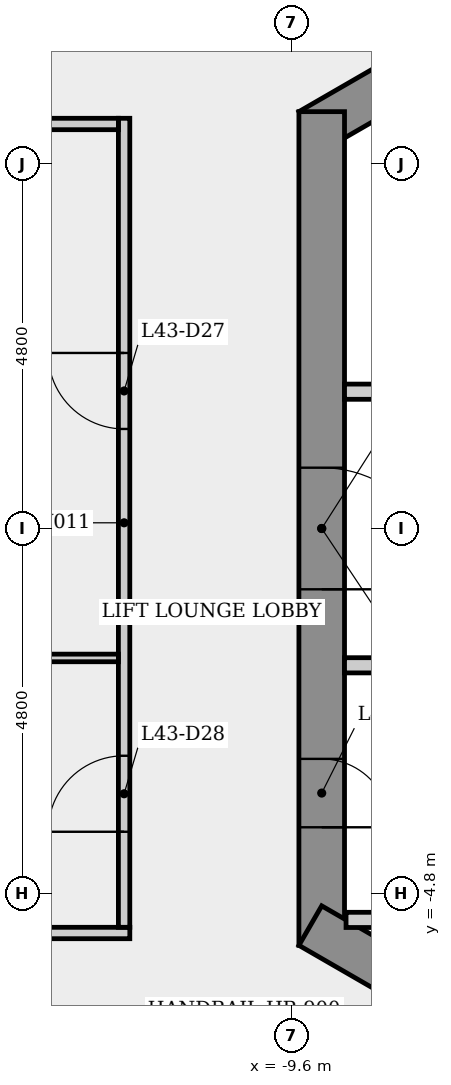
"""IFC4 building model, lengths in metres.
Left out: names, types, materials, properties, quantities, classifications, styles, units other than length and angle.
Written with IfcOpenShell. Run it as: python <this file> out.ifc"""

import sys

from ifc_helpers import new_model, si_unit, direction, frame, frame_2d, origin, place, context, subcontext, project, spatial, rectangle, extrude, element, fill, save


model = new_model("IFC4")
c1 = context("Model", 3, precision=1e-05, world=origin(), true_north=direction((0.0, 1.0)))
c2 = subcontext(c1, "Body", "Model", "MODEL_VIEW")
j1 = project(units=[si_unit("LENGTHUNIT", "METRE"), si_unit("PLANEANGLEUNIT", "RADIAN")], contexts=[c1])
p1 = place(None, origin())
s1 = spatial("IfcSite", under=j1, at=p1, CompositionType="ELEMENT")
p2 = place(p1, origin())
s2 = spatial("IfcBuilding", under=s1, at=p2, CompositionType="ELEMENT")
p3 = place(p2, frame((0.0, 0.0, 162.9)))
s3 = spatial("IfcBuildingStorey", under=s2, at=p3, CompositionType="ELEMENT", Elevation=162.9)
p4 = place(p3, frame((0.15, 10.71, 0.0), z_axis=(0.0, 0.0, 1.0), x_axis=(-0.866023993627, -0.500002442456, 0.0)))
e1 = element("IfcWall", 1, at=p4, inside=s3, PredefinedType="SHEAR", context=c2, shape_type="SweptSolid", body=[
    extrude(rectangle(XDim=10.97, YDim=0.6, at=frame_2d((5.485, 0.0))), origin(), (0.0, 0.0, 1.0), 3.4),
])
p5 = place(p4, frame((7.05, 0.0, 0.0)))
e2 = element("IfcOpeningElement", 2, at=p5, cuts=e1, PredefinedType="OPENING", context=c2, shape_type="SweptSolid", body=[
    extrude(rectangle(XDim=0.9, YDim=2.1, at=frame_2d((0.45, 1.05))), frame((0.0, 0.31, 0.0), z_axis=(0.0, -1.0, 0.0), x_axis=(1.0, 0.0, 0.0)), (0.0, 0.0, 1.0), 0.62),
])
p6 = place(p3, frame((-9.2, 5.485, 0.0), z_axis=(0.0, 0.0, 1.0), x_axis=(0.0, -1.0, 0.0)))
e3 = element("IfcWall", 3, at=p6, inside=s3, PredefinedType="SHEAR", context=c2, shape_type="SweptSolid", body=[
    extrude(rectangle(XDim=10.97, YDim=0.6, at=frame_2d((5.485, 0.0))), origin(), (0.0, 0.0, 1.0), 3.4),
])
p7 = place(p6, frame((8.516, 0.0, 0.0)))
e4 = element("IfcOpeningElement", 4, at=p7, cuts=e3, PredefinedType="OPENING", context=c2, shape_type="SweptSolid", body=[
    extrude(rectangle(XDim=0.9, YDim=2.1, at=frame_2d((0.45, 1.05))), frame((0.0, 0.31, 0.0), z_axis=(0.0, -1.0, 0.0), x_axis=(1.0, 0.0, 0.0)), (0.0, 0.0, 1.0), 0.62),
])
p8 = place(p6, frame((4.685, 0.0, 0.0)))
e5 = element("IfcOpeningElement", 5, at=p8, cuts=e3, PredefinedType="OPENING", context=c2, shape_type="SweptSolid", body=[
    extrude(rectangle(XDim=1.6, YDim=2.1, at=frame_2d((0.8, 1.05))), frame((0.0, 0.31, 0.0), z_axis=(0.0, -1.0, 0.0), x_axis=(1.0, 0.0, 0.0)), (0.0, 0.0, 1.0), 0.62),
])
p9 = place(p3, frame((-9.35, -5.225, 0.0), z_axis=(0.0, 0.0, 1.0), x_axis=(0.866023993627, -0.500002442456, 0.0)))
e6 = element("IfcWall", 6, at=p9, inside=s3, PredefinedType="SHEAR", context=c2, shape_type="SweptSolid", body=[
    extrude(rectangle(XDim=10.97, YDim=0.6, at=frame_2d((5.485, 0.0))), origin(), (0.0, 0.0, 1.0), 3.4),
])
p10 = place(p9, frame((3.891, 0.0, 0.0)))
e7 = element("IfcOpeningElement", 7, at=p10, cuts=e6, PredefinedType="OPENING", context=c2, shape_type="SweptSolid", body=[
    extrude(rectangle(XDim=0.9, YDim=2.1, at=frame_2d((0.45, 1.05))), frame((0.0, 0.31, 0.0), z_axis=(0.0, -1.0, 0.0), x_axis=(1.0, 0.0, 0.0)), (0.0, 0.0, 1.0), 0.62),
])
p11 = place(p9, frame((9.018, 0.0, 0.0)))
e8 = element("IfcOpeningElement", 8, at=p11, cuts=e6, PredefinedType="OPENING", context=c2, shape_type="SweptSolid", body=[
    extrude(rectangle(XDim=0.9, YDim=2.1, at=frame_2d((0.45, 1.05))), frame((0.0, 0.31, 0.0), z_axis=(0.0, -1.0, 0.0), x_axis=(1.0, 0.0, 0.0)), (0.0, 0.0, 1.0), 0.62),
])
p12 = place(p3, frame((-15.709, 5.258, 0.0), z_axis=(0.0, 0.0, 1.0), x_axis=(0.500006657701, 0.866021559925, 0.0)))
e9 = element("IfcWall", 9, at=p12, inside=s3, PredefinedType="PARTITIONING", context=c2, shape_type="SweptSolid", body=[
    extrude(rectangle(XDim=6.816, YDim=0.15, at=frame_2d((3.408, 0.0))), origin(), (0.0, 0.0, 1.0), 3.05),
])
p13 = place(p12, frame((2.908, 0.0, 0.0)))
e10 = element("IfcOpeningElement", 10, at=p13, cuts=e9, PredefinedType="OPENING", context=c2, shape_type="SweptSolid", body=[
    extrude(rectangle(XDim=1.0, YDim=2.1, at=frame_2d((0.5, 1.05))), frame((0.0, 0.085, 0.0), z_axis=(0.0, -1.0, 0.0), x_axis=(1.0, 0.0, 0.0)), (0.0, 0.0, 1.0), 0.17),
])
p14 = place(p3, frame((-15.747, -5.323, 0.0), z_axis=(0.0, 0.0, 1.0), x_axis=(1.0, 0.0, 0.0)))
e11 = element("IfcWall", 11, at=p14, inside=s3, PredefinedType="PARTITIONING", context=c2, shape_type="SweptSolid", body=[
    extrude(rectangle(XDim=4.022, YDim=0.15, at=frame_2d((2.011, 0.0))), origin(), (0.0, 0.0, 1.0), 3.05),
])
p15 = place(p3, frame((-11.8, -5.247, 0.0), z_axis=(0.0, 0.0, 1.0), x_axis=(0.0, 1.0, 0.0)))
e12 = element("IfcWall", 12, at=p15, inside=s3, PredefinedType="PARTITIONING", context=c2, shape_type="SweptSolid", body=[
    extrude(rectangle(XDim=10.645, YDim=0.15, at=frame_2d((5.322, 0.0))), origin(), (0.0, 0.0, 1.0), 3.05),
])
p16 = place(p15, frame((6.557, 0.0, 0.0)))
e13 = element("IfcOpeningElement", 13, at=p16, cuts=e12, PredefinedType="OPENING", context=c2, shape_type="SweptSolid", body=[
    extrude(rectangle(XDim=1.0, YDim=2.1, at=frame_2d((0.5, 1.05))), frame((0.0, 0.085, 0.0), z_axis=(0.0, -1.0, 0.0), x_axis=(1.0, 0.0, 0.0)), (0.0, 0.0, 1.0), 0.17),
])
p17 = place(p15, frame((1.257, 0.0, 0.0)))
e14 = element("IfcOpeningElement", 14, at=p17, cuts=e12, PredefinedType="OPENING", context=c2, shape_type="SweptSolid", body=[
    extrude(rectangle(XDim=1.0, YDim=2.1, at=frame_2d((0.5, 1.05))), frame((0.0, 0.085, 0.0), z_axis=(0.0, -1.0, 0.0), x_axis=(1.0, 0.0, 0.0)), (0.0, 0.0, 1.0), 0.17),
])
p18 = place(p3, frame((-11.875, -1.703, 0.0), z_axis=(0.0, 0.0, 1.0), x_axis=(-1.0, 0.0, 0.0)))
e15 = element("IfcWall", 15, at=p18, inside=s3, PredefinedType="PARTITIONING", context=c2, shape_type="SweptSolid", body=[
    extrude(rectangle(XDim=6.134, YDim=0.1, at=frame_2d((3.067, 0.0))), origin(), (0.0, 0.0, 1.0), 3.05),
])
p19 = place(p3, frame((-11.875, 5.323, 0.0), z_axis=(0.0, 0.0, 1.0), x_axis=(-1.0, 0.0, 0.0)))
e16 = element("IfcWall", 16, at=p19, inside=s3, PredefinedType="PARTITIONING", context=c2, shape_type="SweptSolid", body=[
    extrude(rectangle(XDim=3.721, YDim=0.15, at=frame_2d((1.861, 0.0))), origin(), (0.0, 0.0, 1.0), 3.05),
])
p20 = place(p3, frame((-8.9, 1.8, 0.0), z_axis=(0.0, 0.0, 1.0), x_axis=(1.0, 0.0, 0.0)))
e17 = element("IfcWall", 17, at=p20, inside=s3, PredefinedType="PARTITIONING", context=c2, shape_type="SweptSolid", body=[
    extrude(rectangle(XDim=1.425, YDim=0.2, at=frame_2d((0.712, 0.0))), origin(), (0.0, 0.0, 1.0), 3.05),
])
p21 = place(p3, frame((-8.88, -5.15, 0.0), z_axis=(0.0, 0.0, 1.0), x_axis=(1.0, 0.0, 0.0)))
e18 = element("IfcWall", 18, at=p21, inside=s3, PredefinedType="PARTITIONING", context=c2, shape_type="SweptSolid", body=[
    extrude(rectangle(XDim=11.205, YDim=0.2, at=frame_2d((5.603, 0.0))), origin(), (0.0, 0.0, 1.0), 3.05),
])
p22 = place(p3, frame((-8.9, -1.8, 0.0), z_axis=(0.0, 0.0, 1.0), x_axis=(1.0, 0.0, 0.0)))
e19 = element("IfcWall", 19, at=p22, inside=s3, PredefinedType="PARTITIONING", context=c2, shape_type="SweptSolid", body=[
    extrude(rectangle(XDim=11.225, YDim=0.2, at=frame_2d((5.613, 0.0))), origin(), (0.0, 0.0, 1.0), 3.05),
])
p23 = place(p22, frame((3.035, 0.0, 0.0)))
e20 = element("IfcOpeningElement", 20, at=p23, cuts=e19, PredefinedType="OPENING", context=c2, shape_type="SweptSolid", body=[
    extrude(rectangle(XDim=0.9, YDim=2.1, at=frame_2d((0.45, 1.05))), frame((0.0, 0.11, 0.0), z_axis=(0.0, -1.0, 0.0), x_axis=(1.0, 0.0, 0.0)), (0.0, 0.0, 1.0), 0.22),
])
p24 = place(p22, frame((9.613, 0.0, 0.0)))
e21 = element("IfcOpeningElement", 21, at=p24, cuts=e19, PredefinedType="OPENING", context=c2, shape_type="SweptSolid", body=[
    extrude(rectangle(XDim=0.9, YDim=2.1, at=frame_2d((0.45, 1.05))), frame((0.0, 0.11, 0.0), z_axis=(0.0, -1.0, 0.0), x_axis=(1.0, 0.0, 0.0)), (0.0, 0.0, 1.0), 0.22),
])
p25 = place(p16, origin())
e22 = element("IfcDoor", 22, at=p25, inside=s3, OperationType="SINGLE_SWING_RIGHT", PredefinedType="DOOR", context=c2, shape_type="SweptSolid", body=[
    extrude(rectangle(XDim=1.0, YDim=2.1, at=frame_2d((0.5, 1.05))), frame((0.0, 0.025, 0.0), z_axis=(0.0, -1.0, 0.0), x_axis=(1.0, 0.0, 0.0)), (0.0, 0.0, 1.0), 0.05),
])
fill(e13, e22)
p26 = place(p17, origin())
e23 = element("IfcDoor", 23, at=p26, inside=s3, OperationType="SINGLE_SWING_LEFT", PredefinedType="DOOR", context=c2, shape_type="SweptSolid", body=[
    extrude(rectangle(XDim=1.0, YDim=2.1, at=frame_2d((0.5, 1.05))), frame((0.0, 0.025, 0.0), z_axis=(0.0, -1.0, 0.0), x_axis=(1.0, 0.0, 0.0)), (0.0, 0.0, 1.0), 0.05),
])
fill(e14, e23)
p27 = place(p7, origin())
e24 = element("IfcDoor", 24, at=p27, inside=s3, OperationType="SINGLE_SWING_RIGHT", PredefinedType="DOOR", context=c2, shape_type="SweptSolid", body=[
    extrude(rectangle(XDim=0.9, YDim=2.1, at=frame_2d((0.45, 1.05))), frame((0.0, 0.025, 0.0), z_axis=(0.0, -1.0, 0.0), x_axis=(1.0, 0.0, 0.0)), (0.0, 0.0, 1.0), 0.05),
])
fill(e4, e24)
p28 = place(p8, origin())
e25 = element("IfcDoor", 25, at=p28, inside=s3, OperationType="SINGLE_SWING_RIGHT", PredefinedType="DOOR", context=c2, shape_type="SweptSolid", body=[
    extrude(rectangle(XDim=1.6, YDim=2.1, at=frame_2d((0.8, 1.05))), frame((0.0, 0.025, 0.0), z_axis=(0.0, -1.0, 0.0), x_axis=(1.0, 0.0, 0.0)), (0.0, 0.0, 1.0), 0.05),
])
fill(e5, e25)
save(model, sys.argv[1])
